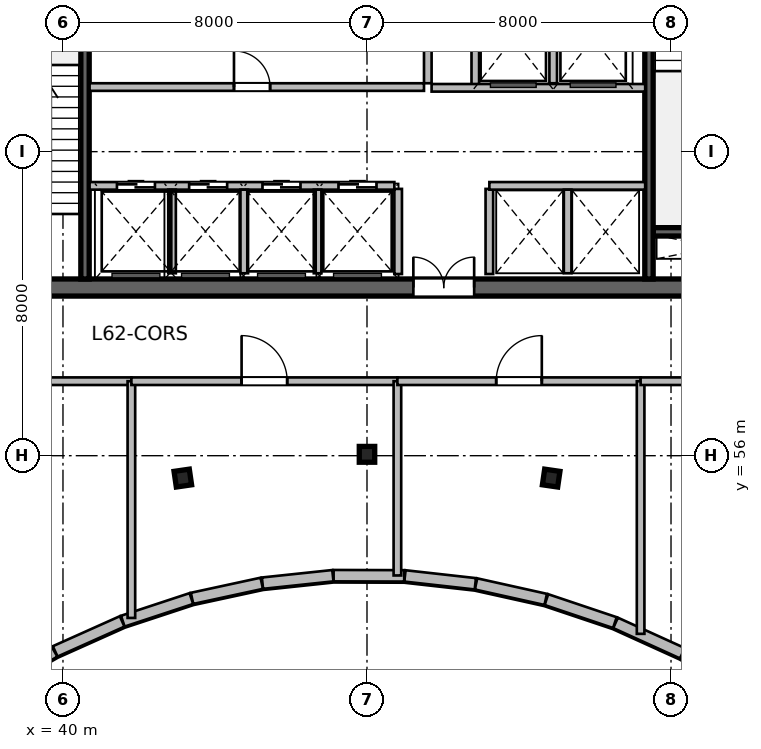
"""IFC4 building model, lengths in metres.
Left out: names, types, materials, properties, quantities, classifications, styles, units other than length and angle.
Written with IfcOpenShell. Run it as: python <this file> out.ifc"""

import sys

from ifc_helpers import new_model, si_unit, direction, frame, frame_2d, origin, origin_2d, place, context, subcontext, project, spatial, rectangle, i_section, extrude, source, transform, mapped, element, fill, save


model = new_model("IFC4")
c1 = context("Model", 3, precision=1e-05, world=origin(), true_north=direction((0.0, 1.0)))
c2 = subcontext(c1, "Body", "Model", "MODEL_VIEW")
j1 = project(units=[si_unit("LENGTHUNIT", "METRE"), si_unit("PLANEANGLEUNIT", "RADIAN")], contexts=[c1])
p1 = place(None, origin())
s1 = spatial("IfcSite", under=j1, at=p1, CompositionType="ELEMENT")
p2 = place(p1, origin())
s2 = spatial("IfcBuilding", under=s1, at=p2, CompositionType="ELEMENT")
p3 = place(p2, frame((0.0, 0.0, 254.7)))
s3 = spatial("IfcBuildingStorey", under=s2, at=p3, CompositionType="ELEMENT", Elevation=254.7)
m1 = source(origin(), c2, "Body", "SweptSolid", [
    extrude(rectangle(XDim=21.6, YDim=0.45, at=frame_2d((10.8, 0.0))), origin(), (0.0, 0.0, 1.0), 5.4),
])
p4 = place(p3, frame((37.2, 60.425, 0.0), z_axis=(0.0, 0.0, 1.0), x_axis=(1.0, 0.0, 0.0)))
e1 = element("IfcWall", 1, at=p4, inside=s3, PredefinedType="SHEAR", context=c2, shape_type="MappedRepresentation", body=[
    mapped(m1, transform((0.0, 0.0, 0.0), scale=1.0)),
])
p5 = place(p4, frame((1.1, 0.0, 0.0)))
e2 = element("IfcOpeningElement", 2, at=p5, cuts=e1, PredefinedType="OPENING", context=c2, shape_type="SweptSolid", body=[
    extrude(rectangle(XDim=1.15, YDim=2.15, at=frame_2d((0.575, 1.075))), frame((0.0, 0.235, 0.0), z_axis=(0.0, -1.0, 0.0), x_axis=(1.0, 0.0, 0.0)), (0.0, 0.0, 1.0), 0.47),
])
p6 = place(p4, frame((19.5, 0.0, 0.0)))
e3 = element("IfcOpeningElement", 3, at=p6, cuts=e1, PredefinedType="OPENING", context=c2, shape_type="SweptSolid", body=[
    extrude(rectangle(XDim=0.9, YDim=2.1, at=frame_2d((0.45, 1.05))), frame((0.0, 0.235, 0.0), z_axis=(0.0, -1.0, 0.0), x_axis=(1.0, 0.0, 0.0)), (0.0, 0.0, 1.0), 0.47),
])
p7 = place(p4, frame((12.02, 0.0, 0.0)))
e4 = element("IfcOpeningElement", 4, at=p7, cuts=e1, PredefinedType="OPENING", context=c2, shape_type="SweptSolid", body=[
    extrude(rectangle(XDim=1.6, YDim=2.15, at=frame_2d((0.8, 1.075))), frame((0.0, 0.235, 0.0), z_axis=(0.0, -1.0, 0.0), x_axis=(1.0, 0.0, 0.0)), (0.0, 0.0, 1.0), 0.47),
])
m2 = source(origin(), c2, "Body", "SweptSolid", [
    extrude(rectangle(XDim=3.27, YDim=0.22, at=frame_2d((1.635, 0.0))), origin(), (0.0, 0.0, 1.0), 5.4),
])
p8 = place(p3, frame((55.53, 61.89, 0.0), z_axis=(0.0, 0.0, 1.0), x_axis=(1.0, 0.0, 0.0)))
e5 = element("IfcWall", 5, at=p8, inside=s3, PredefinedType="SHEAR", context=c2, shape_type="MappedRepresentation", body=[
    mapped(m2, transform((0.0, 0.0, 0.0), scale=1.0)),
])
m3 = source(origin(), c2, "Body", "SweptSolid", [
    extrude(rectangle(XDim=11.1, YDim=0.22, at=frame_2d((5.55, 0.0))), origin(), (0.0, 0.0, 1.0), 5.4),
])
p9 = place(p3, frame((40.58, 60.65, 0.0), z_axis=(0.0, 0.0, 1.0), x_axis=(0.0, 1.0, 0.0)))
e6 = element("IfcWall", 6, at=p9, inside=s3, PredefinedType="SHEAR", context=c2, shape_type="MappedRepresentation", body=[
    mapped(m3, transform((0.0, 0.0, 0.0), scale=1.0)),
])
p10 = place(p3, frame((55.42, 60.65, 0.0), z_axis=(0.0, 0.0, 1.0), x_axis=(0.0, 1.0, 0.0)))
e7 = element("IfcWall", 7, at=p10, inside=s3, PredefinedType="SHEAR", context=c2, shape_type="MappedRepresentation", body=[
    mapped(m3, transform((0.0, 0.0, 0.0), scale=1.0)),
])
p11 = place(p10, frame((9.595, 0.0, 0.0)))
e8 = element("IfcOpeningElement", 8, at=p11, cuts=e7, PredefinedType="OPENING", context=c2, shape_type="SweptSolid", body=[
    extrude(rectangle(XDim=1.15, YDim=2.15, at=frame_2d((0.575, 1.075))), frame((0.0, 0.12, 0.0), z_axis=(0.0, -1.0, 0.0), x_axis=(1.0, 0.0, 0.0)), (0.0, 0.0, 1.0), 0.24),
])
m4 = source(origin(), c2, "Body", "SweptSolid", [
    extrude(i_section(OverallWidth=0.406, OverallDepth=0.416, WebThickness=0.03, FlangeThickness=0.048, at=origin_2d()), origin(), (0.0, 0.0, 1.0), 5.4),
])
for number, where, z_axis, x_axis in (
    (9, (43.154, 55.411, 0.0), (0.0, 0.0, 1.0), (-0.143, 0.99, 0.0)),
    (10, (48.0, 56.036, 0.0), (0.0, 0.0, 1.0), (0.0, 1.0, 0.0)),
    (11, (52.846, 55.411, 0.0), (0.0, 0.0, 1.0), (0.143, 0.99, 0.0)),
):
    element("IfcColumn", number, at=place(p3, frame(where, z_axis=z_axis, x_axis=x_axis)), inside=s3, PredefinedType="COLUMN", context=c2, shape_type="MappedRepresentation", body=[
        mapped(m4, transform((0.0, 0.0, 0.0), scale=1.0)),
    ])
m5 = source(origin(), c2, "Body", "SweptSolid", [
    extrude(rectangle(XDim=1.971, YDim=0.3, at=frame_2d((0.985, 0.0))), origin(), (0.0, 0.0, 1.0), 5.15),
])
p12 = place(p3, frame((58.021, 49.806, 0.0), z_axis=(0.0, 0.0, 1.0), x_axis=(-0.865347122034, 0.5011729825, 0.0)))
e12 = element("IfcWall", 12, at=p12, inside=s3, PredefinedType="SOLIDWALL", context=c2, shape_type="MappedRepresentation", body=[
    mapped(m5, transform((0.0, 0.0, 0.0), scale=1.0)),
])
m6 = source(origin(), c2, "Body", "SweptSolid", [
    extrude(rectangle(XDim=1.933, YDim=0.3, at=frame_2d((0.966, 0.0))), origin(), (0.0, 0.0, 1.0), 5.15),
])
p13 = place(p3, frame((56.3, 50.802, 0.0), z_axis=(0.0, 0.0, 1.0), x_axis=(-0.910478916145, 0.413555489936, 0.0)))
e13 = element("IfcWall", 13, at=p13, inside=s3, PredefinedType="SOLIDWALL", context=c2, shape_type="MappedRepresentation", body=[
    mapped(m6, transform((0.0, 0.0, 0.0), scale=1.0)),
])
m7 = source(origin(), c2, "Body", "SweptSolid", [
    extrude(rectangle(XDim=1.901, YDim=0.3, at=frame_2d((0.951, 0.0))), origin(), (0.0, 0.0, 1.0), 5.15),
])
p14 = place(p3, frame((54.523, 51.608, 0.0), z_axis=(0.0, 0.0, 1.0), x_axis=(-0.94793587841, 0.318461254194, 0.0)))
e14 = element("IfcWall", 14, at=p14, inside=s3, PredefinedType="SOLIDWALL", context=c2, shape_type="MappedRepresentation", body=[
    mapped(m7, transform((0.0, 0.0, 0.0), scale=1.0)),
])
m8 = source(origin(), c2, "Body", "SweptSolid", [
    extrude(rectangle(XDim=1.878, YDim=0.3, at=frame_2d((0.939, 0.0))), origin(), (0.0, 0.0, 1.0), 5.15),
])
p15 = place(p3, frame((52.702, 52.219, 0.0), z_axis=(0.0, 0.0, 1.0), x_axis=(-0.976138082714, 0.217150739061, 0.0)))
e15 = element("IfcWall", 15, at=p15, inside=s3, PredefinedType="SOLIDWALL", context=c2, shape_type="MappedRepresentation", body=[
    mapped(m8, transform((0.0, 0.0, 0.0), scale=1.0)),
])
m9 = source(origin(), c2, "Body", "SweptSolid", [
    extrude(rectangle(XDim=1.863, YDim=0.3, at=frame_2d((0.932, 0.0))), origin(), (0.0, 0.0, 1.0), 5.15),
])
p16 = place(p3, frame((50.851, 52.63, 0.0), z_axis=(0.0, 0.0, 1.0), x_axis=(-0.9937939307, 0.111236789343, 0.0)))
e16 = element("IfcWall", 16, at=p16, inside=s3, PredefinedType="SOLIDWALL", context=c2, shape_type="MappedRepresentation", body=[
    mapped(m9, transform((0.0, 0.0, 0.0), scale=1.0)),
])
m10 = source(origin(), c2, "Body", "SweptSolid", [
    extrude(rectangle(XDim=1.858, YDim=0.3, at=frame_2d((0.929, 0.0))), origin(), (0.0, 0.0, 1.0), 5.15),
])
p17 = place(p3, frame((48.979, 52.838, 0.0), z_axis=(0.0, 0.0, 1.0), x_axis=(-0.999995433965, 0.003021928128, 0.0)))
e17 = element("IfcWall", 17, at=p17, inside=s3, PredefinedType="SOLIDWALL", context=c2, shape_type="MappedRepresentation", body=[
    mapped(m10, transform((0.0, 0.0, 0.0), scale=1.0)),
])
m11 = source(origin(), c2, "Body", "SweptSolid", [
    extrude(rectangle(XDim=1.862, YDim=0.3, at=frame_2d((0.931, 0.0))), origin(), (0.0, 0.0, 1.0), 5.15),
])
p18 = place(p3, frame((47.102, 52.842, 0.0), z_axis=(0.0, 0.0, 1.0), x_axis=(-0.994430497743, -0.1053944266, 0.0)))
e18 = element("IfcWall", 18, at=p18, inside=s3, PredefinedType="SOLIDWALL", context=c2, shape_type="MappedRepresentation", body=[
    mapped(m11, transform((0.0, 0.0, 0.0), scale=1.0)),
])
m12 = source(origin(), c2, "Body", "SweptSolid", [
    extrude(rectangle(XDim=1.877, YDim=0.3, at=frame_2d((0.938, 0.0))), origin(), (0.0, 0.0, 1.0), 5.15),
])
p19 = place(p3, frame((45.231, 52.643, 0.0), z_axis=(0.0, 0.0, 1.0), x_axis=(-0.97737202312, -0.211527606761, 0.0)))
e19 = element("IfcWall", 19, at=p19, inside=s3, PredefinedType="SOLIDWALL", context=c2, shape_type="MappedRepresentation", body=[
    mapped(m12, transform((0.0, 0.0, 0.0), scale=1.0)),
])
m13 = source(origin(), c2, "Body", "SweptSolid", [
    extrude(rectangle(XDim=1.9, YDim=0.3, at=frame_2d((0.95, 0.0))), origin(), (0.0, 0.0, 1.0), 5.15),
])
p20 = place(p3, frame((43.378, 52.241, 0.0), z_axis=(0.0, 0.0, 1.0), x_axis=(-0.949693643068, -0.313180434121, 0.0)))
e20 = element("IfcWall", 20, at=p20, inside=s3, PredefinedType="SOLIDWALL", context=c2, shape_type="MappedRepresentation", body=[
    mapped(m13, transform((0.0, 0.0, 0.0), scale=1.0)),
])
m14 = source(origin(), c2, "Body", "SweptSolid", [
    extrude(rectangle(XDim=1.931, YDim=0.3, at=frame_2d((0.965, 0.0))), origin(), (0.0, 0.0, 1.0), 5.15),
])
p21 = place(p3, frame((41.557, 51.639, 0.0), z_axis=(0.0, 0.0, 1.0), x_axis=(-0.912681759743, -0.408671023481, 0.0)))
e21 = element("IfcWall", 21, at=p21, inside=s3, PredefinedType="SOLIDWALL", context=c2, shape_type="MappedRepresentation", body=[
    mapped(m14, transform((0.0, 0.0, 0.0), scale=1.0)),
])
m15 = source(origin(), c2, "Body", "SweptSolid", [
    extrude(rectangle(XDim=1.969, YDim=0.3, at=frame_2d((0.984, 0.0))), origin(), (0.0, 0.0, 1.0), 5.15),
])
p22 = place(p3, frame((39.779, 50.842, 0.0), z_axis=(0.0, 0.0, 1.0), x_axis=(-0.86797594681, -0.496606238139, 0.0)))
e22 = element("IfcWall", 22, at=p22, inside=s3, PredefinedType="SOLIDWALL", context=c2, shape_type="MappedRepresentation", body=[
    mapped(m15, transform((0.0, 0.0, 0.0), scale=1.0)),
])
m16 = source(origin(), c2, "Body", "SweptSolid", [
    extrude(rectangle(XDim=2.24, YDim=0.2, at=frame_2d((1.12, 0.0))), origin(), (0.0, 0.0, 1.0), 5.15),
])
for number, where, z_axis, x_axis in (
    (23, (48.82, 60.78, 0.0), (0.0, 0.0, 1.0), (0.0, 1.0, 0.0)),
    (24, (51.22, 60.78, 0.0), (0.0, 0.0, 1.0), (0.0, 1.0, 0.0)),
):
    element("IfcWall", number, at=place(p3, frame(where, z_axis=z_axis, x_axis=x_axis)), inside=s3, PredefinedType="SOLIDWALL", context=c2, shape_type="MappedRepresentation", body=[
        mapped(m16, transform((0.0, 0.0, 0.0), scale=1.0)),
    ])
m17 = source(origin(), c2, "Body", "SweptSolid", [
    extrude(rectangle(XDim=5.8, YDim=0.2, at=frame_2d((2.9, 0.0))), origin(), (0.0, 0.0, 1.0), 5.15),
])
p23 = place(p3, frame((49.6, 65.8, 0.0), z_axis=(0.0, 0.0, 1.0), x_axis=(0.0, 1.0, 0.0)))
e25 = element("IfcWall", 25, at=p23, inside=s3, PredefinedType="SOLIDWALL", context=c2, shape_type="MappedRepresentation", body=[
    mapped(m17, transform((0.0, 0.0, 0.0), scale=1.0)),
])
m18 = source(origin(), c2, "Body", "SweptSolid", [
    extrude(rectangle(XDim=2.58, YDim=0.2, at=frame_2d((1.29, 0.0))), origin(), (0.0, 0.0, 1.0), 5.15),
])
p24 = place(p3, frame((50.85, 65.68, 0.0), z_axis=(0.0, 0.0, 1.0), x_axis=(0.0, 1.0, 0.0)))
e26 = element("IfcWall", 26, at=p24, inside=s3, PredefinedType="SOLIDWALL", context=c2, shape_type="MappedRepresentation", body=[
    mapped(m18, transform((0.0, 0.0, 0.0), scale=1.0)),
])
m19 = source(origin(), c2, "Body", "SweptSolid", [
    extrude(rectangle(XDim=2.4, YDim=0.2, at=frame_2d((1.2, 0.0))), origin(), (0.0, 0.0, 1.0), 5.15),
])
p25 = place(p3, frame((52.9, 65.8, 0.0), z_axis=(0.0, 0.0, 1.0), x_axis=(0.0, 1.0, 0.0)))
e27 = element("IfcWall", 27, at=p25, inside=s3, PredefinedType="SOLIDWALL", context=c2, shape_type="MappedRepresentation", body=[
    mapped(m19, transform((0.0, 0.0, 0.0), scale=1.0)),
])
m20 = source(origin(), c2, "Body", "SweptSolid", [
    extrude(rectangle(XDim=5.62, YDim=0.2, at=frame_2d((2.81, 0.0))), origin(), (0.0, 0.0, 1.0), 5.15),
])
p26 = place(p3, frame((49.7, 65.68, 0.0), z_axis=(0.0, 0.0, 1.0), x_axis=(1.0, 0.0, 0.0)))
e28 = element("IfcWall", 28, at=p26, inside=s3, PredefinedType="SOLIDWALL", context=c2, shape_type="MappedRepresentation", body=[
    mapped(m20, transform((0.0, 0.0, 0.0), scale=1.0)),
])
m21 = source(origin(), c2, "Body", "SweptSolid", [
    extrude(rectangle(XDim=8.02, YDim=0.2, at=frame_2d((4.01, 0.0))), origin(), (0.0, 0.0, 1.0), 5.15),
])
p27 = place(p3, frame((40.7, 63.1, 0.0), z_axis=(0.0, 0.0, 1.0), x_axis=(1.0, 0.0, 0.0)))
e29 = element("IfcWall", 29, at=p27, inside=s3, PredefinedType="SOLIDWALL", context=c2, shape_type="MappedRepresentation", body=[
    mapped(m21, transform((0.0, 0.0, 0.0), scale=1.0)),
])
p28 = place(p27, frame((0.72, 0.0, 0.0)))
e30 = element("IfcOpeningElement", 30, at=p28, cuts=e29, PredefinedType="OPENING", context=c2, shape_type="SweptSolid", body=[
    extrude(rectangle(XDim=1.0, YDim=2.15, at=frame_2d((0.5, 1.075))), frame((0.0, 0.11, 0.0), z_axis=(0.0, -1.0, 0.0), x_axis=(1.0, 0.0, 0.0)), (0.0, 0.0, 1.0), 0.22),
])
p29 = place(p27, frame((2.62, 0.0, 0.0)))
e31 = element("IfcOpeningElement", 31, at=p29, cuts=e29, PredefinedType="OPENING", context=c2, shape_type="SweptSolid", body=[
    extrude(rectangle(XDim=1.0, YDim=2.15, at=frame_2d((0.5, 1.075))), frame((0.0, 0.11, 0.0), z_axis=(0.0, -1.0, 0.0), x_axis=(1.0, 0.0, 0.0)), (0.0, 0.0, 1.0), 0.22),
])
p30 = place(p27, frame((4.55, 0.0, 0.0)))
e32 = element("IfcOpeningElement", 32, at=p30, cuts=e29, PredefinedType="OPENING", context=c2, shape_type="SweptSolid", body=[
    extrude(rectangle(XDim=1.0, YDim=2.15, at=frame_2d((0.5, 1.075))), frame((0.0, 0.11, 0.0), z_axis=(0.0, -1.0, 0.0), x_axis=(1.0, 0.0, 0.0)), (0.0, 0.0, 1.0), 0.22),
])
p31 = place(p27, frame((6.55, 0.0, 0.0)))
e33 = element("IfcOpeningElement", 33, at=p31, cuts=e29, PredefinedType="OPENING", context=c2, shape_type="SweptSolid", body=[
    extrude(rectangle(XDim=1.0, YDim=2.15, at=frame_2d((0.5, 1.075))), frame((0.0, 0.11, 0.0), z_axis=(0.0, -1.0, 0.0), x_axis=(1.0, 0.0, 0.0)), (0.0, 0.0, 1.0), 0.22),
])
m22 = source(origin(), c2, "Body", "SweptSolid", [
    extrude(rectangle(XDim=4.1, YDim=0.2, at=frame_2d((2.05, 0.0))), origin(), (0.0, 0.0, 1.0), 5.15),
])
p32 = place(p3, frame((51.22, 63.1, 0.0), z_axis=(0.0, 0.0, 1.0), x_axis=(1.0, 0.0, 0.0)))
e34 = element("IfcWall", 34, at=p32, inside=s3, PredefinedType="SOLIDWALL", context=c2, shape_type="MappedRepresentation", body=[
    mapped(m22, transform((0.0, 0.0, 0.0), scale=1.0)),
])
m23 = source(origin(), c2, "Body", "SweptSolid", [
    extrude(rectangle(XDim=2.2, YDim=0.2, at=frame_2d((1.1, 0.0))), origin(), (0.0, 0.0, 1.0), 5.15),
])
for number, where, z_axis, x_axis in (
    (35, (42.87, 60.8, 0.0), (0.0, 0.0, 1.0), (0.0, 1.0, 0.0)),
    (36, (44.77, 60.8, 0.0), (0.0, 0.0, 1.0), (0.0, 1.0, 0.0)),
    (37, (46.7, 60.8, 0.0), (0.0, 0.0, 1.0), (0.0, 1.0, 0.0)),
    (38, (53.28, 60.8, 0.0), (0.0, 0.0, 1.0), (0.0, 1.0, 0.0)),
):
    element("IfcWall", number, at=place(p3, frame(where, z_axis=z_axis, x_axis=x_axis)), inside=s3, PredefinedType="SOLIDWALL", context=c2, shape_type="MappedRepresentation", body=[
        mapped(m23, transform((0.0, 0.0, 0.0), scale=1.0)),
    ])
m24 = source(origin(), c2, "Body", "SweptSolid", [
    extrude(rectangle(XDim=8.8, YDim=0.2, at=frame_2d((4.4, 0.0))), origin(), (0.0, 0.0, 1.0), 5.15),
])
p33 = place(p3, frame((40.7, 65.7, 0.0), z_axis=(0.0, 0.0, 1.0), x_axis=(1.0, 0.0, 0.0)))
e39 = element("IfcWall", 39, at=p33, inside=s3, PredefinedType="SOLIDWALL", context=c2, shape_type="MappedRepresentation", body=[
    mapped(m24, transform((0.0, 0.0, 0.0), scale=1.0)),
])
p34 = place(p33, frame((3.8, 0.0, 0.0)))
e40 = element("IfcOpeningElement", 40, at=p34, cuts=e39, PredefinedType="OPENING", context=c2, shape_type="SweptSolid", body=[
    extrude(rectangle(XDim=0.95, YDim=2.15, at=frame_2d((0.475, 1.075))), frame((0.0, 0.11, 0.0), z_axis=(0.0, -1.0, 0.0), x_axis=(1.0, 0.0, 0.0)), (0.0, 0.0, 1.0), 0.22),
])
m25 = source(origin(), c2, "Body", "SweptSolid", [
    extrude(rectangle(XDim=7.35, YDim=0.2, at=frame_2d((3.675, 0.0))), origin(), (0.0, 0.0, 1.0), 4.824),
])
p35 = place(p3, frame((34.45, 57.96, 0.0), z_axis=(0.0, 0.0, 1.0), x_axis=(1.0, 0.0, 0.0)))
e41 = element("IfcWall", 41, at=p35, inside=s3, PredefinedType="SOLIDWALL", context=c2, shape_type="MappedRepresentation", body=[
    mapped(m25, transform((0.0, 0.0, 0.0), scale=1.0)),
])
p36 = place(p35, frame((3.075, 0.0, 0.0)))
e42 = element("IfcOpeningElement", 42, at=p36, cuts=e41, PredefinedType="OPENING", context=c2, shape_type="SweptSolid", body=[
    extrude(rectangle(XDim=1.2, YDim=2.15, at=frame_2d((0.6, 1.075))), frame((0.0, 0.11, 0.0), z_axis=(0.0, -1.0, 0.0), x_axis=(1.0, 0.0, 0.0)), (0.0, 0.0, 1.0), 0.22),
])
m26 = source(origin(), c2, "Body", "SweptSolid", [
    extrude(rectangle(XDim=6.229, YDim=0.2, at=frame_2d((3.115, 0.0))), origin(), (0.0, 0.0, 1.0), 5.15),
])
p37 = place(p3, frame((41.8, 51.731, 0.0), z_axis=(0.0, 0.0, 1.0), x_axis=(0.0, 1.0, 0.0)))
e43 = element("IfcWall", 43, at=p37, inside=s3, PredefinedType="SOLIDWALL", context=c2, shape_type="MappedRepresentation", body=[
    mapped(m26, transform((0.0, 0.0, 0.0), scale=1.0)),
])
m27 = source(origin(), c2, "Body", "SweptSolid", [
    extrude(rectangle(XDim=7.0, YDim=0.2, at=frame_2d((3.5, 0.0))), origin(), (0.0, 0.0, 1.0), 5.15),
])
p38 = place(p3, frame((41.8, 57.96, 0.0), z_axis=(0.0, 0.0, 1.0), x_axis=(1.0, 0.0, 0.0)))
e44 = element("IfcWall", 44, at=p38, inside=s3, PredefinedType="SOLIDWALL", context=c2, shape_type="MappedRepresentation", body=[
    mapped(m27, transform((0.0, 0.0, 0.0), scale=1.0)),
])
p39 = place(p38, frame((2.9, 0.0, 0.0)))
e45 = element("IfcOpeningElement", 45, at=p39, cuts=e44, PredefinedType="OPENING", context=c2, shape_type="SweptSolid", body=[
    extrude(rectangle(XDim=1.2, YDim=2.15, at=frame_2d((0.6, 1.075))), frame((0.0, 0.11, 0.0), z_axis=(0.0, -1.0, 0.0), x_axis=(1.0, 0.0, 0.0)), (0.0, 0.0, 1.0), 0.22),
])
m28 = source(origin(), c2, "Body", "SweptSolid", [
    extrude(rectangle(XDim=5.112, YDim=0.2, at=frame_2d((2.556, 0.0))), origin(), (0.0, 0.0, 1.0), 5.15),
])
p40 = place(p3, frame((48.8, 52.848, 0.0), z_axis=(0.0, 0.0, 1.0), x_axis=(0.0, 1.0, 0.0)))
e46 = element("IfcWall", 46, at=p40, inside=s3, PredefinedType="SOLIDWALL", context=c2, shape_type="MappedRepresentation", body=[
    mapped(m28, transform((0.0, 0.0, 0.0), scale=1.0)),
])
m29 = source(origin(), c2, "Body", "SweptSolid", [
    extrude(rectangle(XDim=6.4, YDim=0.2, at=frame_2d((3.2, 0.0))), origin(), (0.0, 0.0, 1.0), 5.15),
])
p41 = place(p3, frame((48.8, 57.96, 0.0), z_axis=(0.0, 0.0, 1.0), x_axis=(1.0, 0.0, 0.0)))
e47 = element("IfcWall", 47, at=p41, inside=s3, PredefinedType="SOLIDWALL", context=c2, shape_type="MappedRepresentation", body=[
    mapped(m29, transform((0.0, 0.0, 0.0), scale=1.0)),
])
p42 = place(p41, frame((2.6, 0.0, 0.0)))
e48 = element("IfcOpeningElement", 48, at=p42, cuts=e47, PredefinedType="OPENING", context=c2, shape_type="SweptSolid", body=[
    extrude(rectangle(XDim=1.2, YDim=2.15, at=frame_2d((0.6, 1.075))), frame((0.0, 0.11, 0.0), z_axis=(0.0, -1.0, 0.0), x_axis=(1.0, 0.0, 0.0)), (0.0, 0.0, 1.0), 0.22),
])
m30 = source(origin(), c2, "Body", "SweptSolid", [
    extrude(rectangle(XDim=6.647, YDim=0.2, at=frame_2d((3.324, 0.0))), origin(), (0.0, 0.0, 1.0), 5.15),
])
p43 = place(p3, frame((55.2, 51.312, 0.0), z_axis=(0.0, 0.0, 1.0), x_axis=(0.0, 1.0, 0.0)))
e49 = element("IfcWall", 49, at=p43, inside=s3, PredefinedType="SOLIDWALL", context=c2, shape_type="MappedRepresentation", body=[
    mapped(m30, transform((0.0, 0.0, 0.0), scale=1.0)),
])
m31 = source(origin(), c2, "Body", "SweptSolid", [
    extrude(rectangle(XDim=6.35, YDim=0.2, at=frame_2d((3.175, 0.0))), origin(), (0.0, 0.0, 1.0), 4.824),
])
p44 = place(p3, frame((55.2, 57.96, 0.0), z_axis=(0.0, 0.0, 1.0), x_axis=(1.0, 0.0, 0.0)))
e50 = element("IfcWall", 50, at=p44, inside=s3, PredefinedType="SOLIDWALL", context=c2, shape_type="MappedRepresentation", body=[
    mapped(m31, transform((0.0, 0.0, 0.0), scale=1.0)),
])
p45 = place(p44, frame((2.575, 0.0, 0.0)))
e51 = element("IfcOpeningElement", 51, at=p45, cuts=e50, PredefinedType="OPENING", context=c2, shape_type="SweptSolid", body=[
    extrude(rectangle(XDim=1.2, YDim=2.15, at=frame_2d((0.6, 1.075))), frame((0.0, 0.11, 0.0), z_axis=(0.0, -1.0, 0.0), x_axis=(1.0, 0.0, 0.0)), (0.0, 0.0, 1.0), 0.22),
])
m32 = source(origin(), c2, "Body", "SweptSolid", [
    extrude(rectangle(XDim=1.6, YDim=2.15, at=frame_2d((0.8, 1.075))), frame((0.0, 0.025, 0.0), z_axis=(0.0, -1.0, 0.0), x_axis=(1.0, 0.0, 0.0)), (0.0, 0.0, 1.0), 0.05),
])
p46 = place(p7, origin())
e52 = element("IfcDoor", 52, at=p46, inside=s3, OperationType="DOUBLE_DOOR_SINGLE_SWING", PredefinedType="DOOR", context=c2, shape_type="MappedRepresentation", body=[
    mapped(m32, transform((0.0, 0.0, 0.0), scale=1.0)),
])
fill(e4, e52)
m33 = source(origin(), c2, "Body", "SweptSolid", [
    extrude(rectangle(XDim=1.0, YDim=2.15, at=frame_2d((0.5, 1.075))), frame((0.0, 0.025, 0.0), z_axis=(0.0, -1.0, 0.0), x_axis=(1.0, 0.0, 0.0)), (0.0, 0.0, 1.0), 0.05),
])
p47 = place(p28, origin())
e53 = element("IfcDoor", 53, at=p47, inside=s3, OperationType="DOUBLE_DOOR_SLIDING", PredefinedType="DOOR", context=c2, shape_type="MappedRepresentation", body=[
    mapped(m33, transform((0.0, 0.0, 0.0), scale=1.0)),
])
fill(e30, e53)
p48 = place(p29, origin())
e54 = element("IfcDoor", 54, at=p48, inside=s3, OperationType="DOUBLE_DOOR_SLIDING", PredefinedType="DOOR", context=c2, shape_type="MappedRepresentation", body=[
    mapped(m33, transform((0.0, 0.0, 0.0), scale=1.0)),
])
fill(e31, e54)
p49 = place(p30, origin())
e55 = element("IfcDoor", 55, at=p49, inside=s3, OperationType="DOUBLE_DOOR_SLIDING", PredefinedType="DOOR", context=c2, shape_type="MappedRepresentation", body=[
    mapped(m33, transform((0.0, 0.0, 0.0), scale=1.0)),
])
fill(e32, e55)
p50 = place(p31, origin())
e56 = element("IfcDoor", 56, at=p50, inside=s3, OperationType="DOUBLE_DOOR_SLIDING", PredefinedType="DOOR", context=c2, shape_type="MappedRepresentation", body=[
    mapped(m33, transform((0.0, 0.0, 0.0), scale=1.0)),
])
fill(e33, e56)
m34 = source(origin(), c2, "Body", "SweptSolid", [
    extrude(rectangle(XDim=0.95, YDim=2.15, at=frame_2d((0.475, 1.075))), frame((0.0, 0.025, 0.0), z_axis=(0.0, -1.0, 0.0), x_axis=(1.0, 0.0, 0.0)), (0.0, 0.0, 1.0), 0.05),
])
p51 = place(p34, origin())
e57 = element("IfcDoor", 57, at=p51, inside=s3, OperationType="SINGLE_SWING_LEFT", PredefinedType="DOOR", context=c2, shape_type="MappedRepresentation", body=[
    mapped(m34, transform((0.0, 0.0, 0.0), scale=1.0)),
])
fill(e40, e57)
m35 = source(origin(), c2, "Body", "SweptSolid", [
    extrude(rectangle(XDim=1.2, YDim=2.15, at=frame_2d((0.6, 1.075))), frame((0.0, 0.025, 0.0), z_axis=(0.0, -1.0, 0.0), x_axis=(1.0, 0.0, 0.0)), (0.0, 0.0, 1.0), 0.05),
])
p52 = place(p39, origin())
e58 = element("IfcDoor", 58, at=p52, inside=s3, OperationType="SINGLE_SWING_LEFT", PredefinedType="DOOR", context=c2, shape_type="MappedRepresentation", body=[
    mapped(m35, transform((0.0, 0.0, 0.0), scale=1.0)),
])
fill(e45, e58)
p53 = place(p42, origin())
e59 = element("IfcDoor", 59, at=p53, inside=s3, OperationType="SINGLE_SWING_RIGHT", PredefinedType="DOOR", context=c2, shape_type="MappedRepresentation", body=[
    mapped(m35, transform((0.0, 0.0, 0.0), scale=1.0)),
])
fill(e48, e59)
save(model, sys.argv[1])
